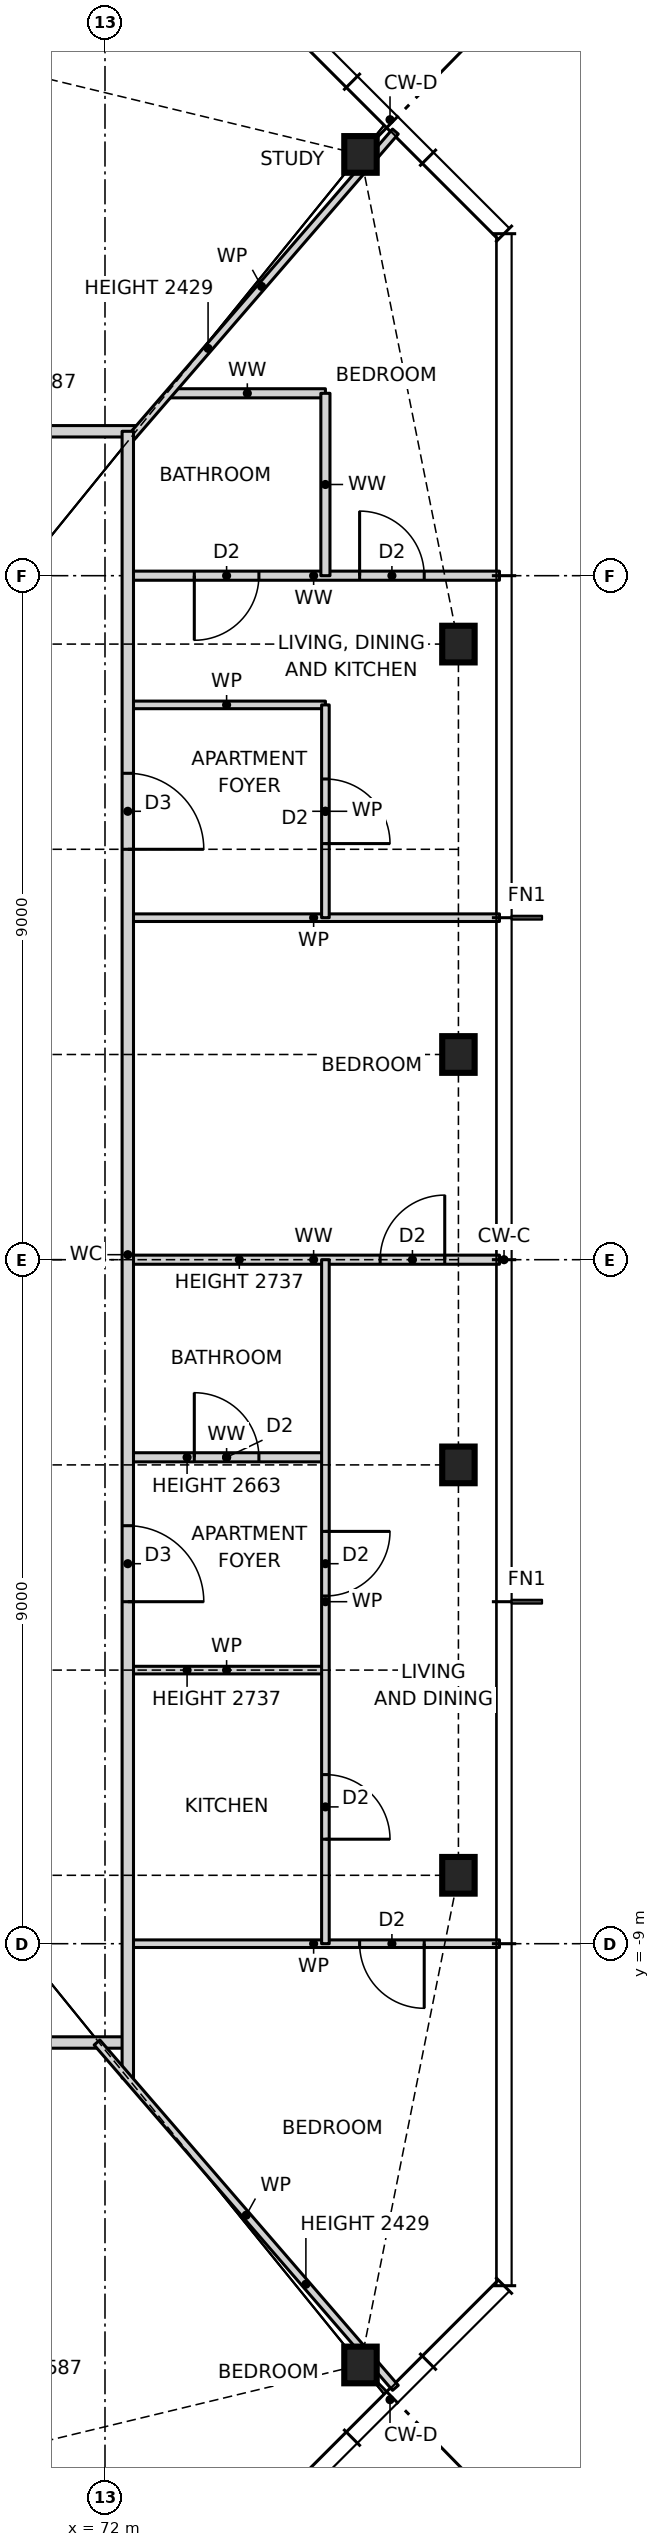
"""IFC4 building model, lengths in metres.
Left out: names, types, materials, properties, quantities, classifications, styles, units other than length and angle.
Written with IfcOpenShell. Run it as: python <this file> out.ifc"""

import sys

from ifc_helpers import new_model, si_unit, direction, frame, frame_2d, origin, origin_2d, place, context, subcontext, project, spatial, rectangle, i_section, extrude, element, fill, save


model = new_model("IFC4")
c1 = context("Model", 3, precision=1e-05, world=origin(), true_north=direction((0.0, 1.0)))
c2 = subcontext(c1, "Body", "Model", "MODEL_VIEW")
j1 = project(units=[si_unit("LENGTHUNIT", "METRE"), si_unit("PLANEANGLEUNIT", "RADIAN")], contexts=[c1])
p1 = place(None, origin())
s1 = spatial("IfcSite", under=j1, at=p1, CompositionType="ELEMENT")
p2 = place(p1, origin())
s2 = spatial("IfcBuilding", under=s1, at=p2, CompositionType="ELEMENT")
p3 = place(p2, frame((0.0, 0.0, 101.5)))
s3 = spatial("IfcBuildingStorey", under=s2, at=p3, CompositionType="ELEMENT", Elevation=101.5)
for number, where, z_axis, x_axis in (
    (1, (75.361, -14.543, 0.0), (0.0, 0.0, 1.0), (1.0, 0.0, 0.0)),
    (2, (76.65, -8.1, 0.0), (0.0, 0.0, 1.0), (1.0, 0.0, 0.0)),
    (3, (76.65, -2.7, 0.0), (0.0, 0.0, 1.0), (1.0, 0.0, 0.0)),
    (4, (76.65, 2.7, 0.0), (0.0, 0.0, 1.0), (1.0, 0.0, 0.0)),
    (5, (76.65, 8.1, 0.0), (0.0, 0.0, 1.0), (1.0, 0.0, 0.0)),
    (6, (75.361, 14.543, 0.0), (0.0, 0.0, 1.0), (1.0, 0.0, 0.0)),
):
    element("IfcColumn", number, at=place(p3, frame(where, z_axis=z_axis, x_axis=x_axis)), inside=s3, PredefinedType="COLUMN", context=c2, shape_type="SweptSolid", body=[
        extrude(i_section(OverallWidth=0.427, OverallDepth=0.483, WebThickness=0.051, FlangeThickness=0.082, at=origin_2d()), origin(), (0.0, 0.0, 1.0), 3.5),
    ])
p4 = place(p3, frame((53.7, -10.3, 0.0), z_axis=(0.0, 0.0, 1.0), x_axis=(1.0, 0.0, 0.0)))
e7 = element("IfcWall", 7, at=p4, inside=s3, PredefinedType="PARTITIONING", context=c2, shape_type="SweptSolid", body=[
    extrude(rectangle(XDim=18.6, YDim=0.15, at=frame_2d((9.3, 0.0))), origin(), (0.0, 0.0, 1.0), 3.27),
])
p5 = place(p4, frame((8.8, 0.0, 0.0)))
e8 = element("IfcOpeningElement", 8, at=p5, cuts=e7, PredefinedType="OPENING", context=c2, shape_type="SweptSolid", body=[
    extrude(rectangle(XDim=1.0, YDim=2.1, at=frame_2d((0.5, 1.05))), frame((0.0, 0.085, 0.0), z_axis=(0.0, -1.0, 0.0), x_axis=(1.0, 0.0, 0.0)), (0.0, 0.0, 1.0), 0.17),
])
p6 = place(p3, frame((72.3, -9.0, 0.0), z_axis=(0.0, 0.0, 1.0), x_axis=(1.0, 0.0, 0.0)))
e9 = element("IfcWall", 9, at=p6, inside=s3, PredefinedType="PARTITIONING", context=c2, shape_type="SweptSolid", body=[
    extrude(rectangle(XDim=4.89, YDim=0.1, at=frame_2d((2.445, 0.0))), origin(), (0.0, 0.0, 1.0), 3.27),
])
p7 = place(p6, frame((3.05, 0.0, 0.0)))
e10 = element("IfcOpeningElement", 10, at=p7, cuts=e9, PredefinedType="OPENING", context=c2, shape_type="SweptSolid", body=[
    extrude(rectangle(XDim=0.85, YDim=2.1, at=frame_2d((0.425, 1.05))), frame((0.0, 0.06, 0.0), z_axis=(0.0, -1.0, 0.0), x_axis=(1.0, 0.0, 0.0)), (0.0, 0.0, 1.0), 0.12),
])
p8 = place(p3, frame((72.3, -5.4, 0.0), z_axis=(0.0, 0.0, 1.0), x_axis=(1.0, 0.0, 0.0)))
e11 = element("IfcWall", 11, at=p8, inside=s3, PredefinedType="PARTITIONING", context=c2, shape_type="SweptSolid", body=[
    extrude(rectangle(XDim=2.6, YDim=0.1, at=frame_2d((1.3, 0.0))), origin(), (0.0, 0.0, 1.0), 2.737),
])
p9 = place(p3, frame((72.3, -2.6, 0.0), z_axis=(0.0, 0.0, 1.0), x_axis=(1.0, 0.0, 0.0)))
e12 = element("IfcWall", 12, at=p9, inside=s3, PredefinedType="PARTITIONING", context=c2, shape_type="SweptSolid", body=[
    extrude(rectangle(XDim=2.6, YDim=0.12, at=frame_2d((1.3, 0.0))), origin(), (0.0, 0.0, 1.0), 2.663),
])
p10 = place(p9, frame((0.875, 0.0, 0.0)))
e13 = element("IfcOpeningElement", 13, at=p10, cuts=e12, PredefinedType="OPENING", context=c2, shape_type="SweptSolid", body=[
    extrude(rectangle(XDim=0.85, YDim=2.1, at=frame_2d((0.425, 1.05))), frame((0.0, 0.07, 0.0), z_axis=(0.0, -1.0, 0.0), x_axis=(1.0, 0.0, 0.0)), (0.0, 0.0, 1.0), 0.14),
])
p11 = place(p3, frame((72.3, 0.0, 0.0), z_axis=(0.0, 0.0, 1.0), x_axis=(1.0, 0.0, 0.0)))
e14 = element("IfcWall", 14, at=p11, inside=s3, PredefinedType="PARTITIONING", context=c2, shape_type="SweptSolid", body=[
    extrude(rectangle(XDim=4.89, YDim=0.12, at=frame_2d((2.445, 0.0))), origin(), (0.0, 0.0, 1.0), 2.737),
])
p12 = place(p11, frame((3.32, 0.0, 0.0)))
e15 = element("IfcOpeningElement", 15, at=p12, cuts=e14, PredefinedType="OPENING", context=c2, shape_type="SweptSolid", body=[
    extrude(rectangle(XDim=0.85, YDim=2.1, at=frame_2d((0.425, 1.05))), frame((0.0, 0.07, 0.0), z_axis=(0.0, -1.0, 0.0), x_axis=(1.0, 0.0, 0.0)), (0.0, 0.0, 1.0), 0.14),
])
p13 = place(p3, frame((72.3, 4.5, 0.0), z_axis=(0.0, 0.0, 1.0), x_axis=(1.0, 0.0, 0.0)))
e16 = element("IfcWall", 16, at=p13, inside=s3, PredefinedType="PARTITIONING", context=c2, shape_type="SweptSolid", body=[
    extrude(rectangle(XDim=4.89, YDim=0.1, at=frame_2d((2.445, 0.0))), origin(), (0.0, 0.0, 1.0), 3.27),
])
p14 = place(p3, frame((72.3, 7.3, 0.0), z_axis=(0.0, 0.0, 1.0), x_axis=(1.0, 0.0, 0.0)))
e17 = element("IfcWall", 17, at=p14, inside=s3, PredefinedType="PARTITIONING", context=c2, shape_type="SweptSolid", body=[
    extrude(rectangle(XDim=2.6, YDim=0.1, at=frame_2d((1.3, 0.0))), origin(), (0.0, 0.0, 1.0), 3.27),
])
p15 = place(p3, frame((72.3, 9.0, 0.0), z_axis=(0.0, 0.0, 1.0), x_axis=(1.0, 0.0, 0.0)))
e18 = element("IfcWall", 18, at=p15, inside=s3, PredefinedType="PARTITIONING", context=c2, shape_type="SweptSolid", body=[
    extrude(rectangle(XDim=4.89, YDim=0.12, at=frame_2d((2.445, 0.0))), origin(), (0.0, 0.0, 1.0), 3.27),
])
p16 = place(p15, frame((0.875, 0.0, 0.0)))
e19 = element("IfcOpeningElement", 19, at=p16, cuts=e18, PredefinedType="OPENING", context=c2, shape_type="SweptSolid", body=[
    extrude(rectangle(XDim=0.85, YDim=2.1, at=frame_2d((0.425, 1.05))), frame((0.0, 0.07, 0.0), z_axis=(0.0, -1.0, 0.0), x_axis=(1.0, 0.0, 0.0)), (0.0, 0.0, 1.0), 0.14),
])
p17 = place(p15, frame((3.05, 0.0, 0.0)))
e20 = element("IfcOpeningElement", 20, at=p17, cuts=e18, PredefinedType="OPENING", context=c2, shape_type="SweptSolid", body=[
    extrude(rectangle(XDim=0.85, YDim=2.1, at=frame_2d((0.425, 1.05))), frame((0.0, 0.07, 0.0), z_axis=(0.0, -1.0, 0.0), x_axis=(1.0, 0.0, 0.0)), (0.0, 0.0, 1.0), 0.14),
])
p18 = place(p3, frame((53.586, 10.9, 0.0), z_axis=(0.0, 0.0, 1.0), x_axis=(1.0, 0.0, 0.0)))
e21 = element("IfcWall", 21, at=p18, inside=s3, PredefinedType="PARTITIONING", context=c2, shape_type="SweptSolid", body=[
    extrude(rectangle(XDim=18.828, YDim=0.15, at=frame_2d((9.414, 0.0))), origin(), (0.0, 0.0, 1.0), 3.27),
])
p19 = place(p18, frame((8.914, 0.0, 0.0)))
e22 = element("IfcOpeningElement", 22, at=p19, cuts=e21, PredefinedType="OPENING", context=c2, shape_type="SweptSolid", body=[
    extrude(rectangle(XDim=1.0, YDim=2.1, at=frame_2d((0.5, 1.05))), frame((0.0, 0.085, 0.0), z_axis=(0.0, -1.0, 0.0), x_axis=(1.0, 0.0, 0.0)), (0.0, 0.0, 1.0), 0.17),
])
p20 = place(p3, frame((72.845, 11.4, 0.0), z_axis=(0.0, 0.0, 1.0), x_axis=(1.0, 0.0, 0.0)))
e23 = element("IfcWall", 23, at=p20, inside=s3, PredefinedType="PARTITIONING", context=c2, shape_type="SweptSolid", body=[
    extrude(rectangle(XDim=2.055, YDim=0.12, at=frame_2d((1.027, 0.0))), origin(), (0.0, 0.0, 1.0), 3.27),
])
p21 = place(p3, frame((72.3, 10.768, 0.0), z_axis=(0.0, 0.0, 1.0), x_axis=(0.653709560919, 0.756745538449, 0.0)))
e24 = element("IfcWall", 24, at=p21, inside=s3, PredefinedType="PARTITIONING", context=c2, shape_type="SweptSolid", body=[
    extrude(rectangle(XDim=5.386, YDim=0.1, at=frame_2d((2.693, 0.0))), origin(), (0.0, 0.0, 1.0), 2.429),
])
p22 = place(p3, frame((74.9, -9.0, 0.0), z_axis=(0.0, 0.0, 1.0), x_axis=(0.0, 1.0, 0.0)))
e25 = element("IfcWall", 25, at=p22, inside=s3, PredefinedType="PARTITIONING", context=c2, shape_type="SweptSolid", body=[
    extrude(rectangle(XDim=9.0, YDim=0.1, at=frame_2d((4.5, 0.0))), origin(), (0.0, 0.0, 1.0), 3.27),
])
p23 = place(p22, frame((1.375, 0.0, 0.0)))
e26 = element("IfcOpeningElement", 26, at=p23, cuts=e25, PredefinedType="OPENING", context=c2, shape_type="SweptSolid", body=[
    extrude(rectangle(XDim=0.85, YDim=2.1, at=frame_2d((0.425, 1.05))), frame((0.0, 0.06, 0.0), z_axis=(0.0, -1.0, 0.0), x_axis=(1.0, 0.0, 0.0)), (0.0, 0.0, 1.0), 0.12),
])
p24 = place(p22, frame((4.575, 0.0, 0.0)))
e27 = element("IfcOpeningElement", 27, at=p24, cuts=e25, PredefinedType="OPENING", context=c2, shape_type="SweptSolid", body=[
    extrude(rectangle(XDim=0.85, YDim=2.1, at=frame_2d((0.425, 1.05))), frame((0.0, 0.06, 0.0), z_axis=(0.0, -1.0, 0.0), x_axis=(1.0, 0.0, 0.0)), (0.0, 0.0, 1.0), 0.12),
])
p25 = place(p3, frame((74.9, 4.5, 0.0), z_axis=(0.0, 0.0, 1.0), x_axis=(0.0, 1.0, 0.0)))
e28 = element("IfcWall", 28, at=p25, inside=s3, PredefinedType="PARTITIONING", context=c2, shape_type="SweptSolid", body=[
    extrude(rectangle(XDim=2.8, YDim=0.1, at=frame_2d((1.4, 0.0))), origin(), (0.0, 0.0, 1.0), 3.27),
])
p26 = place(p25, frame((0.975, 0.0, 0.0)))
e29 = element("IfcOpeningElement", 29, at=p26, cuts=e28, PredefinedType="OPENING", context=c2, shape_type="SweptSolid", body=[
    extrude(rectangle(XDim=0.85, YDim=2.1, at=frame_2d((0.425, 1.05))), frame((0.0, 0.06, 0.0), z_axis=(0.0, -1.0, 0.0), x_axis=(1.0, 0.0, 0.0)), (0.0, 0.0, 1.0), 0.12),
])
p27 = place(p3, frame((74.9, 9.0, 0.0), z_axis=(0.0, 0.0, 1.0), x_axis=(0.0, 1.0, 0.0)))
e30 = element("IfcWall", 30, at=p27, inside=s3, PredefinedType="PARTITIONING", context=c2, shape_type="SweptSolid", body=[
    extrude(rectangle(XDim=2.4, YDim=0.12, at=frame_2d((1.2, 0.0))), origin(), (0.0, 0.0, 1.0), 3.27),
])
p28 = place(p3, frame((72.3, -10.768, 0.0), z_axis=(0.0, 0.0, 1.0), x_axis=(0.0, 1.0, 0.0)))
e31 = element("IfcWall", 31, at=p28, inside=s3, PredefinedType="PARTITIONING", context=c2, shape_type="SweptSolid", body=[
    extrude(rectangle(XDim=21.668, YDim=0.15, at=frame_2d((10.834, 0.0))), origin(), (0.0, 0.0, 1.0), 3.27),
])
p29 = place(p28, frame((6.268, 0.0, 0.0)))
e32 = element("IfcOpeningElement", 32, at=p29, cuts=e31, PredefinedType="OPENING", context=c2, shape_type="SweptSolid", body=[
    extrude(rectangle(XDim=1.0, YDim=2.1, at=frame_2d((0.5, 1.05))), frame((0.0, 0.085, 0.0), z_axis=(0.0, -1.0, 0.0), x_axis=(1.0, 0.0, 0.0)), (0.0, 0.0, 1.0), 0.17),
])
p30 = place(p28, frame((16.168, 0.0, 0.0)))
e33 = element("IfcOpeningElement", 33, at=p30, cuts=e31, PredefinedType="OPENING", context=c2, shape_type="SweptSolid", body=[
    extrude(rectangle(XDim=1.0, YDim=2.1, at=frame_2d((0.5, 1.05))), frame((0.0, 0.085, 0.0), z_axis=(0.0, -1.0, 0.0), x_axis=(1.0, 0.0, 0.0)), (0.0, 0.0, 1.0), 0.17),
])
p31 = place(p3, frame((75.821, -14.844, 0.0), z_axis=(0.0, 0.0, 1.0), x_axis=(-0.65378286253, 0.756682211144, 0.0)))
e34 = element("IfcWall", 34, at=p31, inside=s3, PredefinedType="PARTITIONING", context=c2, shape_type="SweptSolid", body=[
    extrude(rectangle(XDim=6.005, YDim=0.1, at=frame_2d((3.002, 0.0))), origin(), (0.0, 0.0, 1.0), 2.429),
])
p32 = place(p23, frame((0.85, 0.0, 0.0), z_axis=(0.0, 0.0, 1.0), x_axis=(-1.0, 0.0, 0.0)))
e35 = element("IfcDoor", 35, at=p32, inside=s3, OperationType="SINGLE_SWING_RIGHT", PredefinedType="DOOR", context=c2, shape_type="SweptSolid", body=[
    extrude(rectangle(XDim=0.85, YDim=2.1, at=frame_2d((0.425, 1.05))), frame((0.0, 0.025, 0.0), z_axis=(0.0, -1.0, 0.0), x_axis=(1.0, 0.0, 0.0)), (0.0, 0.0, 1.0), 0.05),
])
fill(e26, e35)
p33 = place(p29, frame((1.0, 0.0, 0.0), z_axis=(0.0, 0.0, 1.0), x_axis=(-1.0, 0.0, 0.0)))
e36 = element("IfcDoor", 36, at=p33, inside=s3, OperationType="SINGLE_SWING_RIGHT", PredefinedType="DOOR", context=c2, shape_type="SweptSolid", body=[
    extrude(rectangle(XDim=1.0, YDim=2.1, at=frame_2d((0.5, 1.05))), frame((0.0, 0.025, 0.0), z_axis=(0.0, -1.0, 0.0), x_axis=(1.0, 0.0, 0.0)), (0.0, 0.0, 1.0), 0.05),
])
fill(e32, e36)
p34 = place(p24, frame((0.85, 0.0, 0.0), z_axis=(0.0, 0.0, 1.0), x_axis=(-1.0, 0.0, 0.0)))
e37 = element("IfcDoor", 37, at=p34, inside=s3, OperationType="SINGLE_SWING_LEFT", PredefinedType="DOOR", context=c2, shape_type="SweptSolid", body=[
    extrude(rectangle(XDim=0.85, YDim=2.1, at=frame_2d((0.425, 1.05))), frame((0.0, 0.025, 0.0), z_axis=(0.0, -1.0, 0.0), x_axis=(1.0, 0.0, 0.0)), (0.0, 0.0, 1.0), 0.05),
])
fill(e27, e37)
p35 = place(p10, origin())
e38 = element("IfcDoor", 38, at=p35, inside=s3, OperationType="SINGLE_SWING_LEFT", PredefinedType="DOOR", context=c2, shape_type="SweptSolid", body=[
    extrude(rectangle(XDim=0.85, YDim=2.1, at=frame_2d((0.425, 1.05))), frame((0.0, 0.025, 0.0), z_axis=(0.0, -1.0, 0.0), x_axis=(1.0, 0.0, 0.0)), (0.0, 0.0, 1.0), 0.05),
])
fill(e13, e38)
p36 = place(p7, frame((0.85, 0.0, 0.0), z_axis=(0.0, 0.0, 1.0), x_axis=(-1.0, 0.0, 0.0)))
e39 = element("IfcDoor", 39, at=p36, inside=s3, OperationType="SINGLE_SWING_LEFT", PredefinedType="DOOR", context=c2, shape_type="SweptSolid", body=[
    extrude(rectangle(XDim=0.85, YDim=2.1, at=frame_2d((0.425, 1.05))), frame((0.0, 0.025, 0.0), z_axis=(0.0, -1.0, 0.0), x_axis=(1.0, 0.0, 0.0)), (0.0, 0.0, 1.0), 0.05),
])
fill(e10, e39)
p37 = place(p12, origin())
e40 = element("IfcDoor", 40, at=p37, inside=s3, OperationType="SINGLE_SWING_RIGHT", PredefinedType="DOOR", context=c2, shape_type="SweptSolid", body=[
    extrude(rectangle(XDim=0.85, YDim=2.1, at=frame_2d((0.425, 1.05))), frame((0.0, 0.025, 0.0), z_axis=(0.0, -1.0, 0.0), x_axis=(1.0, 0.0, 0.0)), (0.0, 0.0, 1.0), 0.05),
])
fill(e15, e40)
p38 = place(p30, frame((1.0, 0.0, 0.0), z_axis=(0.0, 0.0, 1.0), x_axis=(-1.0, 0.0, 0.0)))
e41 = element("IfcDoor", 41, at=p38, inside=s3, OperationType="SINGLE_SWING_RIGHT", PredefinedType="DOOR", context=c2, shape_type="SweptSolid", body=[
    extrude(rectangle(XDim=1.0, YDim=2.1, at=frame_2d((0.5, 1.05))), frame((0.0, 0.025, 0.0), z_axis=(0.0, -1.0, 0.0), x_axis=(1.0, 0.0, 0.0)), (0.0, 0.0, 1.0), 0.05),
])
fill(e33, e41)
p39 = place(p26, frame((0.85, 0.0, 0.0), z_axis=(0.0, 0.0, 1.0), x_axis=(-1.0, 0.0, 0.0)))
e42 = element("IfcDoor", 42, at=p39, inside=s3, OperationType="SINGLE_SWING_RIGHT", PredefinedType="DOOR", context=c2, shape_type="SweptSolid", body=[
    extrude(rectangle(XDim=0.85, YDim=2.1, at=frame_2d((0.425, 1.05))), frame((0.0, 0.025, 0.0), z_axis=(0.0, -1.0, 0.0), x_axis=(1.0, 0.0, 0.0)), (0.0, 0.0, 1.0), 0.05),
])
fill(e29, e42)
p40 = place(p16, frame((0.85, 0.0, 0.0), z_axis=(0.0, 0.0, 1.0), x_axis=(-1.0, 0.0, 0.0)))
e43 = element("IfcDoor", 43, at=p40, inside=s3, OperationType="SINGLE_SWING_RIGHT", PredefinedType="DOOR", context=c2, shape_type="SweptSolid", body=[
    extrude(rectangle(XDim=0.85, YDim=2.1, at=frame_2d((0.425, 1.05))), frame((0.0, 0.025, 0.0), z_axis=(0.0, -1.0, 0.0), x_axis=(1.0, 0.0, 0.0)), (0.0, 0.0, 1.0), 0.05),
])
fill(e19, e43)
p41 = place(p17, origin())
e44 = element("IfcDoor", 44, at=p41, inside=s3, OperationType="SINGLE_SWING_LEFT", PredefinedType="DOOR", context=c2, shape_type="SweptSolid", body=[
    extrude(rectangle(XDim=0.85, YDim=2.1, at=frame_2d((0.425, 1.05))), frame((0.0, 0.025, 0.0), z_axis=(0.0, -1.0, 0.0), x_axis=(1.0, 0.0, 0.0)), (0.0, 0.0, 1.0), 0.05),
])
fill(e20, e44)
save(model, sys.argv[1])
